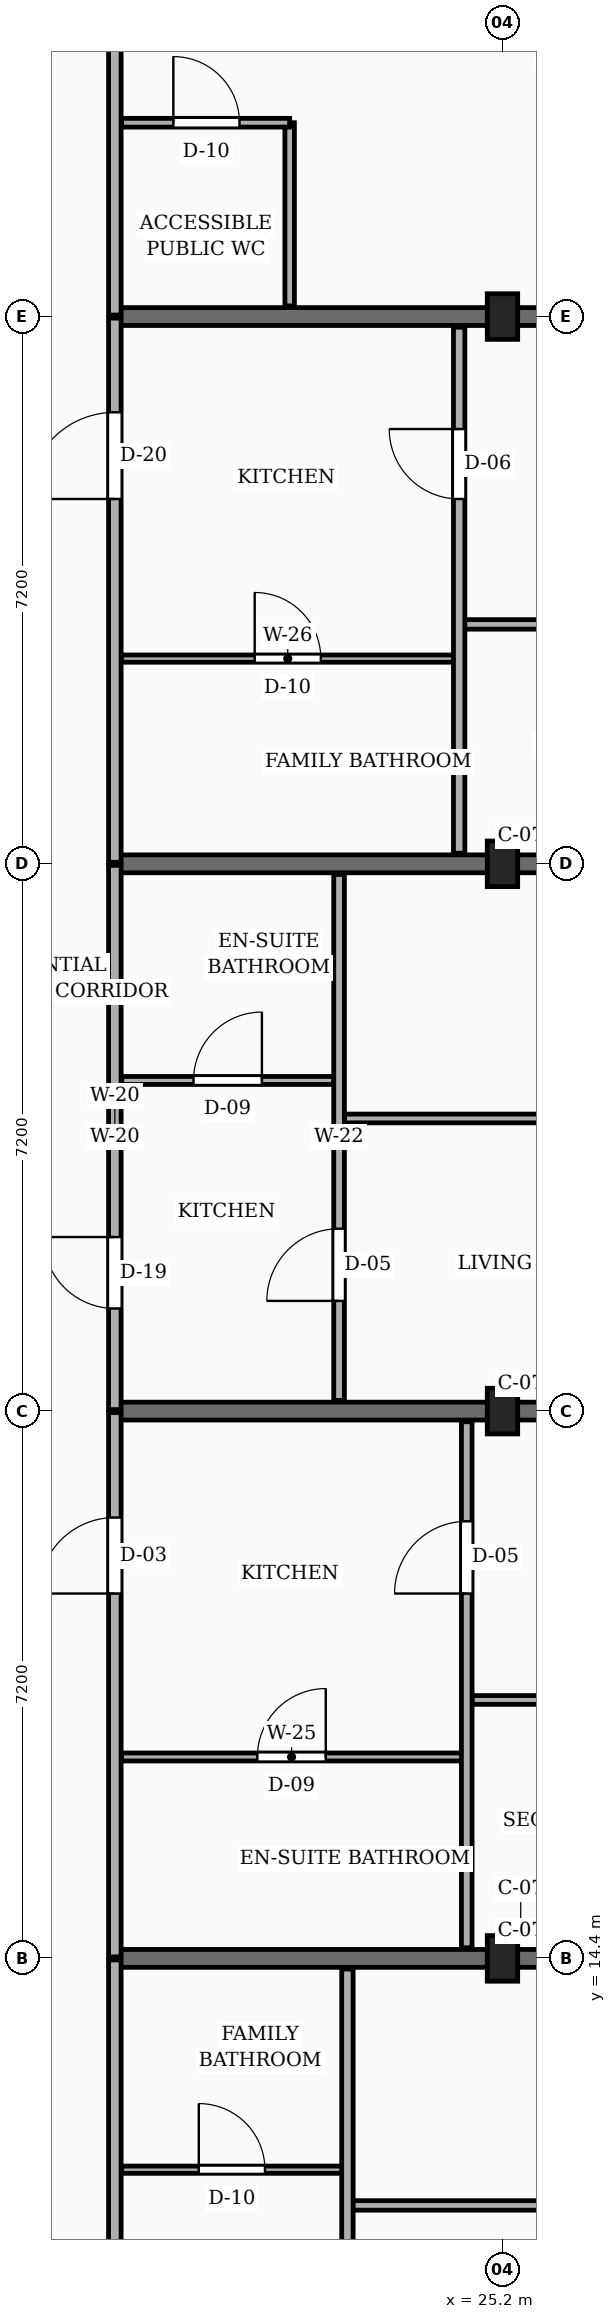
"""IFC4 building model, lengths in metres.
Left out: names, types, materials, properties, quantities, classifications, styles, units other than length and angle.
Written with IfcOpenShell. Run it as: python <this file> out.ifc"""

import sys

from ifc_helpers import new_model, si_unit, direction, frame, frame_2d, origin, origin_2d, place, context, subcontext, project, spatial, rectangle, extrude, element, fill, save


model = new_model("IFC4")
c1 = context("Model", 3, precision=1e-05, world=origin(), true_north=direction((0.0, 1.0)))
c2 = subcontext(c1, "Body", "Model", "MODEL_VIEW")
j1 = project(units=[si_unit("LENGTHUNIT", "METRE"), si_unit("PLANEANGLEUNIT", "RADIAN")], contexts=[c1])
p1 = place(None, origin())
s1 = spatial("IfcSite", under=j1, at=p1, CompositionType="ELEMENT")
p2 = place(p1, origin())
s2 = spatial("IfcBuilding", under=s1, at=p2, CompositionType="ELEMENT")
p3 = place(p2, frame((0.0, 0.0, 23.4)))
s3 = spatial("IfcBuildingStorey", under=s2, at=p3, CompositionType="ELEMENT", Elevation=23.4)
for number, where, z_axis, x_axis in (
    (1, (25.2, 14.4, 0.0), (0.0, 0.0, 1.0), (1.0, 0.0, 0.0)),
    (2, (25.2, 21.6, 0.0), (0.0, 0.0, 1.0), (1.0, 0.0, 0.0)),
    (3, (25.2, 28.8, 0.0), (0.0, 0.0, 1.0), (1.0, 0.0, 0.0)),
    (4, (25.2, 36.0, 0.0), (0.0, 0.0, 1.0), (1.0, 0.0, 0.0)),
):
    element("IfcColumn", number, at=place(p3, frame(where, z_axis=z_axis, x_axis=x_axis)), inside=s3, PredefinedType="COLUMN", context=c2, shape_type="SweptSolid", body=[
        extrude(rectangle(XDim=0.4, YDim=0.6, at=origin_2d()), origin(), (0.0, 0.0, 1.0), 3.15),
    ])
for number, where, z_axis, x_axis in (
    (5, (20.1, 14.4, 0.0), (0.0, 0.0, 1.0), (1.0, 0.0, 0.0)),
    (6, (20.1, 21.6, 0.0), (0.0, 0.0, 1.0), (1.0, 0.0, 0.0)),
    (7, (20.1, 28.8, 0.0), (0.0, 0.0, 1.0), (1.0, 0.0, 0.0)),
    (8, (20.1, 36.0, 0.0), (0.0, 0.0, 1.0), (1.0, 0.0, 0.0)),
):
    element("IfcWall", number, at=place(p3, frame(where, z_axis=z_axis, x_axis=x_axis)), inside=s3, PredefinedType="SOLIDWALL", context=c2, shape_type="SweptSolid", body=[
        extrude(rectangle(XDim=12.05, YDim=0.235, at=frame_2d((6.025, 0.0))), origin(), (0.0, 0.0, 1.0), 2.17),
    ])
p4 = place(p3, frame((20.1, 7.375, 0.0), z_axis=(0.0, 0.0, 1.0), x_axis=(0.0, 1.0, 0.0)))
e9 = element("IfcWall", 9, at=p4, inside=s3, PredefinedType="PARTITIONING", context=c2, shape_type="SweptSolid", body=[
    extrude(rectangle(XDim=7.005, YDim=0.165, at=frame_2d((3.502, 0.0))), origin(), (0.0, 0.0, 1.0), 2.305),
])
p5 = place(p4, frame((1.175, 0.0, 0.0)))
e10 = element("IfcOpeningElement", 10, at=p5, cuts=e9, PredefinedType="OPENING", context=c2, shape_type="SweptSolid", body=[
    extrude(rectangle(XDim=1.14, YDim=2.18, at=frame_2d((0.57, 1.09))), frame((0.0, 0.093, 0.0), z_axis=(0.0, -1.0, 0.0), x_axis=(1.0, 0.0, 0.0)), (0.0, 0.0, 1.0), 0.185),
])
p6 = place(p3, frame((20.1, 14.42, 0.0), z_axis=(0.0, 0.0, 1.0), x_axis=(0.0, 1.0, 0.0)))
e11 = element("IfcWall", 11, at=p6, inside=s3, PredefinedType="PARTITIONING", context=c2, shape_type="SweptSolid", body=[
    extrude(rectangle(XDim=7.16, YDim=0.165, at=frame_2d((3.58, 0.0))), origin(), (0.0, 0.0, 1.0), 2.305),
])
p7 = place(p6, frame((4.78, 0.0, 0.0)))
e12 = element("IfcOpeningElement", 12, at=p7, cuts=e11, PredefinedType="OPENING", context=c2, shape_type="SweptSolid", body=[
    extrude(rectangle(XDim=1.0, YDim=2.15, at=frame_2d((0.5, 1.075))), frame((0.0, 0.093, 0.0), z_axis=(0.0, -1.0, 0.0), x_axis=(1.0, 0.0, 0.0)), (0.0, 0.0, 1.0), 0.185),
])
p8 = place(p3, frame((20.1, 21.62, 0.0), z_axis=(0.0, 0.0, 1.0), x_axis=(0.0, 1.0, 0.0)))
e13 = element("IfcWall", 13, at=p8, inside=s3, PredefinedType="PARTITIONING", context=c2, shape_type="SweptSolid", body=[
    extrude(rectangle(XDim=7.16, YDim=0.165, at=frame_2d((3.58, 0.0))), origin(), (0.0, 0.0, 1.0), 2.305),
])
p9 = place(p8, frame((1.33, 0.0, 0.0)))
e14 = element("IfcOpeningElement", 14, at=p9, cuts=e13, PredefinedType="OPENING", context=c2, shape_type="SweptSolid", body=[
    extrude(rectangle(XDim=0.94, YDim=2.12, at=frame_2d((0.47, 1.06))), frame((0.0, 0.093, 0.0), z_axis=(0.0, -1.0, 0.0), x_axis=(1.0, 0.0, 0.0)), (0.0, 0.0, 1.0), 0.185),
])
p10 = place(p3, frame((20.1, 28.82, 0.0), z_axis=(0.0, 0.0, 1.0), x_axis=(0.0, 1.0, 0.0)))
e15 = element("IfcWall", 15, at=p10, inside=s3, PredefinedType="PARTITIONING", context=c2, shape_type="SweptSolid", body=[
    extrude(rectangle(XDim=7.16, YDim=0.165, at=frame_2d((3.58, 0.0))), origin(), (0.0, 0.0, 1.0), 2.305),
])
p11 = place(p10, frame((4.78, 0.0, 0.0)))
e16 = element("IfcOpeningElement", 16, at=p11, cuts=e15, PredefinedType="OPENING", context=c2, shape_type="SweptSolid", body=[
    extrude(rectangle(XDim=1.14, YDim=2.18, at=frame_2d((0.57, 1.09))), frame((0.0, 0.093, 0.0), z_axis=(0.0, -1.0, 0.0), x_axis=(1.0, 0.0, 0.0)), (0.0, 0.0, 1.0), 0.185),
])
p12 = place(p3, frame((20.1, 36.02, 0.0), z_axis=(0.0, 0.0, 1.0), x_axis=(0.0, 1.0, 0.0)))
e17 = element("IfcWall", 17, at=p12, inside=s3, PredefinedType="PARTITIONING", context=c2, shape_type="SweptSolid", body=[
    extrude(rectangle(XDim=7.005, YDim=0.165, at=frame_2d((3.502, 0.0))), origin(), (0.0, 0.0, 1.0), 2.305),
])
p13 = place(p12, frame((4.33, 0.0, 0.0)))
e18 = element("IfcOpeningElement", 18, at=p13, cuts=e17, PredefinedType="OPENING", context=c2, shape_type="SweptSolid", body=[
    extrude(rectangle(XDim=1.1, YDim=2.15, at=frame_2d((0.55, 1.075))), frame((0.0, 0.093, 0.0), z_axis=(0.0, -1.0, 0.0), x_axis=(1.0, 0.0, 0.0)), (0.0, 0.0, 1.0), 0.185),
])
p14 = place(p3, frame((23.23, 11.15, 0.0), z_axis=(0.0, 0.0, 1.0), x_axis=(1.0, 0.0, 0.0)))
e19 = element("IfcWall", 19, at=p14, inside=s3, PredefinedType="PARTITIONING", context=c2, shape_type="SweptSolid", body=[
    extrude(rectangle(XDim=8.995, YDim=0.125, at=frame_2d((4.498, 0.0))), origin(), (0.0, 0.0, 1.0), 2.305),
])
p15 = place(p14, frame((4.058, 0.0, 0.0)))
e20 = element("IfcOpeningElement", 20, at=p15, cuts=e19, PredefinedType="OPENING", context=c2, shape_type="SweptSolid", body=[
    extrude(rectangle(XDim=0.88, YDim=2.08, at=frame_2d((0.44, 1.04))), frame((0.0, 0.073, 0.0), z_axis=(0.0, -1.0, 0.0), x_axis=(1.0, 0.0, 0.0)), (0.0, 0.0, 1.0), 0.145),
])
p16 = place(p3, frame((20.19, 11.62, 0.0), z_axis=(0.0, 0.0, 1.0), x_axis=(1.0, 0.0, 0.0)))
e21 = element("IfcWall", 21, at=p16, inside=s3, PredefinedType="PARTITIONING", context=c2, shape_type="SweptSolid", body=[
    extrude(rectangle(XDim=2.9, YDim=0.095, at=frame_2d((1.45, 0.0))), origin(), (0.0, 0.0, 1.0), 2.305),
])
p17 = place(p16, frame((1.015, 0.0, 0.0)))
e22 = element("IfcOpeningElement", 22, at=p17, cuts=e21, PredefinedType="OPENING", context=c2, shape_type="SweptSolid", body=[
    extrude(rectangle(XDim=0.87, YDim=2.05, at=frame_2d((0.435, 1.025))), frame((0.0, 0.058, 0.0), z_axis=(0.0, -1.0, 0.0), x_axis=(1.0, 0.0, 0.0)), (0.0, 0.0, 1.0), 0.115),
])
p18 = place(p3, frame((23.16, 7.375, 0.0), z_axis=(0.0, 0.0, 1.0), x_axis=(0.0, 1.0, 0.0)))
e23 = element("IfcWall", 23, at=p18, inside=s3, PredefinedType="PARTITIONING", context=c2, shape_type="SweptSolid", body=[
    extrude(rectangle(XDim=6.885, YDim=0.15, at=frame_2d((3.442, 0.0))), origin(), (0.0, 0.0, 1.0), 2.305),
])
p19 = place(p18, frame((1.275, 0.0, 0.0)))
e24 = element("IfcOpeningElement", 24, at=p19, cuts=e23, PredefinedType="OPENING", context=c2, shape_type="SweptSolid", body=[
    extrude(rectangle(XDim=0.92, YDim=2.1, at=frame_2d((0.46, 1.05))), frame((0.0, 0.085, 0.0), z_axis=(0.0, -1.0, 0.0), x_axis=(1.0, 0.0, 0.0)), (0.0, 0.0, 1.0), 0.17),
])
p20 = place(p3, frame((24.8, 17.8, 0.0), z_axis=(0.0, 0.0, 1.0), x_axis=(1.0, 0.0, 0.0)))
e25 = element("IfcWall", 25, at=p20, inside=s3, PredefinedType="PARTITIONING", context=c2, shape_type="SweptSolid", body=[
    extrude(rectangle(XDim=7.425, YDim=0.115, at=frame_2d((3.712, 0.0))), origin(), (0.0, 0.0, 1.0), 2.305),
])
p21 = place(p20, frame((3.262, 0.0, 0.0)))
e26 = element("IfcOpeningElement", 26, at=p21, cuts=e25, PredefinedType="OPENING", context=c2, shape_type="SweptSolid", body=[
    extrude(rectangle(XDim=0.9, YDim=2.1, at=frame_2d((0.45, 1.05))), frame((0.0, 0.067, 0.0), z_axis=(0.0, -1.0, 0.0), x_axis=(1.0, 0.0, 0.0)), (0.0, 0.0, 1.0), 0.135),
])
p22 = place(p3, frame((20.19, 17.05, 0.0), z_axis=(0.0, 0.0, 1.0), x_axis=(1.0, 0.0, 0.0)))
e27 = element("IfcWall", 27, at=p22, inside=s3, PredefinedType="PARTITIONING", context=c2, shape_type="SweptSolid", body=[
    extrude(rectangle(XDim=4.47, YDim=0.105, at=frame_2d((2.235, 0.0))), origin(), (0.0, 0.0, 1.0), 2.305),
])
p23 = place(p22, frame((1.785, 0.0, 0.0)))
e28 = element("IfcOpeningElement", 28, at=p23, cuts=e27, PredefinedType="OPENING", context=c2, shape_type="SweptSolid", body=[
    extrude(rectangle(XDim=0.9, YDim=2.05, at=frame_2d((0.45, 1.025))), frame((0.0, 0.062, 0.0), z_axis=(0.0, -1.0, 0.0), x_axis=(1.0, 0.0, 0.0)), (0.0, 0.0, 1.0), 0.125),
])
p24 = place(p3, frame((24.73, 14.54, 0.0), z_axis=(0.0, 0.0, 1.0), x_axis=(0.0, 1.0, 0.0)))
e29 = element("IfcWall", 29, at=p24, inside=s3, PredefinedType="PARTITIONING", context=c2, shape_type="SweptSolid", body=[
    extrude(rectangle(XDim=6.92, YDim=0.14, at=frame_2d((3.46, 0.0))), origin(), (0.0, 0.0, 1.0), 2.305),
])
p25 = place(p24, frame((4.66, 0.0, 0.0)))
e30 = element("IfcOpeningElement", 30, at=p25, cuts=e29, PredefinedType="OPENING", context=c2, shape_type="SweptSolid", body=[
    extrude(rectangle(XDim=0.95, YDim=2.1, at=frame_2d((0.475, 1.05))), frame((0.0, 0.08, 0.0), z_axis=(0.0, -1.0, 0.0), x_axis=(1.0, 0.0, 0.0)), (0.0, 0.0, 1.0), 0.16),
])
p26 = place(p3, frame((23.12, 25.45, 0.0), z_axis=(0.0, 0.0, 1.0), x_axis=(1.0, 0.0, 0.0)))
e31 = element("IfcWall", 31, at=p26, inside=s3, PredefinedType="PARTITIONING", context=c2, shape_type="SweptSolid", body=[
    extrude(rectangle(XDim=9.105, YDim=0.115, at=frame_2d((4.552, 0.0))), origin(), (0.0, 0.0, 1.0), 2.305),
])
p27 = place(p26, frame((4.103, 0.0, 0.0)))
e32 = element("IfcOpeningElement", 32, at=p27, cuts=e31, PredefinedType="OPENING", context=c2, shape_type="SweptSolid", body=[
    extrude(rectangle(XDim=0.9, YDim=2.1, at=frame_2d((0.45, 1.05))), frame((0.0, 0.067, 0.0), z_axis=(0.0, -1.0, 0.0), x_axis=(1.0, 0.0, 0.0)), (0.0, 0.0, 1.0), 0.135),
])
p28 = place(p3, frame((20.19, 25.95, 0.0), z_axis=(0.0, 0.0, 1.0), x_axis=(1.0, 0.0, 0.0)))
e33 = element("IfcWall", 33, at=p28, inside=s3, PredefinedType="PARTITIONING", context=c2, shape_type="SweptSolid", body=[
    extrude(rectangle(XDim=2.79, YDim=0.105, at=frame_2d((1.395, 0.0))), origin(), (0.0, 0.0, 1.0), 2.305),
])
p29 = place(p28, frame((0.945, 0.0, 0.0)))
e34 = element("IfcOpeningElement", 34, at=p29, cuts=e33, PredefinedType="OPENING", context=c2, shape_type="SweptSolid", body=[
    extrude(rectangle(XDim=0.9, YDim=2.05, at=frame_2d((0.45, 1.025))), frame((0.0, 0.062, 0.0), z_axis=(0.0, -1.0, 0.0), x_axis=(1.0, 0.0, 0.0)), (0.0, 0.0, 1.0), 0.125),
])
p30 = place(p3, frame((23.05, 21.74, 0.0), z_axis=(0.0, 0.0, 1.0), x_axis=(0.0, 1.0, 0.0)))
e35 = element("IfcWall", 35, at=p30, inside=s3, PredefinedType="PARTITIONING", context=c2, shape_type="SweptSolid", body=[
    extrude(rectangle(XDim=6.92, YDim=0.14, at=frame_2d((3.46, 0.0))), origin(), (0.0, 0.0, 1.0), 2.305),
])
p31 = place(p30, frame((1.31, 0.0, 0.0)))
e36 = element("IfcOpeningElement", 36, at=p31, cuts=e35, PredefinedType="OPENING", context=c2, shape_type="SweptSolid", body=[
    extrude(rectangle(XDim=0.95, YDim=2.1, at=frame_2d((0.475, 1.05))), frame((0.0, 0.08, 0.0), z_axis=(0.0, -1.0, 0.0), x_axis=(1.0, 0.0, 0.0)), (0.0, 0.0, 1.0), 0.16),
])
p32 = place(p3, frame((24.7, 31.95, 0.0), z_axis=(0.0, 0.0, 1.0), x_axis=(1.0, 0.0, 0.0)))
e37 = element("IfcWall", 37, at=p32, inside=s3, PredefinedType="PARTITIONING", context=c2, shape_type="SweptSolid", body=[
    extrude(rectangle(XDim=7.525, YDim=0.125, at=frame_2d((3.763, 0.0))), origin(), (0.0, 0.0, 1.0), 2.305),
])
p33 = place(p32, frame((3.323, 0.0, 0.0)))
e38 = element("IfcOpeningElement", 38, at=p33, cuts=e37, PredefinedType="OPENING", context=c2, shape_type="SweptSolid", body=[
    extrude(rectangle(XDim=0.88, YDim=2.08, at=frame_2d((0.44, 1.04))), frame((0.0, 0.073, 0.0), z_axis=(0.0, -1.0, 0.0), x_axis=(1.0, 0.0, 0.0)), (0.0, 0.0, 1.0), 0.145),
])
p34 = place(p3, frame((20.19, 31.5, 0.0), z_axis=(0.0, 0.0, 1.0), x_axis=(1.0, 0.0, 0.0)))
e39 = element("IfcWall", 39, at=p34, inside=s3, PredefinedType="PARTITIONING", context=c2, shape_type="SweptSolid", body=[
    extrude(rectangle(XDim=4.37, YDim=0.095, at=frame_2d((2.185, 0.0))), origin(), (0.0, 0.0, 1.0), 2.305),
])
p35 = place(p34, frame((1.75, 0.0, 0.0)))
e40 = element("IfcOpeningElement", 40, at=p35, cuts=e39, PredefinedType="OPENING", context=c2, shape_type="SweptSolid", body=[
    extrude(rectangle(XDim=0.87, YDim=2.05, at=frame_2d((0.435, 1.025))), frame((0.0, 0.058, 0.0), z_axis=(0.0, -1.0, 0.0), x_axis=(1.0, 0.0, 0.0)), (0.0, 0.0, 1.0), 0.115),
])
p36 = place(p3, frame((24.63, 28.94, 0.0), z_axis=(0.0, 0.0, 1.0), x_axis=(0.0, 1.0, 0.0)))
e41 = element("IfcWall", 41, at=p36, inside=s3, PredefinedType="PARTITIONING", context=c2, shape_type="SweptSolid", body=[
    extrude(rectangle(XDim=6.92, YDim=0.15, at=frame_2d((3.46, 0.0))), origin(), (0.0, 0.0, 1.0), 2.305),
])
p37 = place(p36, frame((4.66, 0.0, 0.0)))
e42 = element("IfcOpeningElement", 42, at=p37, cuts=e41, PredefinedType="OPENING", context=c2, shape_type="SweptSolid", body=[
    extrude(rectangle(XDim=0.92, YDim=2.1, at=frame_2d((0.46, 1.05))), frame((0.0, 0.085, 0.0), z_axis=(0.0, -1.0, 0.0), x_axis=(1.0, 0.0, 0.0)), (0.0, 0.0, 1.0), 0.17),
])
p38 = place(p3, frame((22.4, 36.14, 0.0), z_axis=(0.0, 0.0, 1.0), x_axis=(0.0, 1.0, 0.0)))
e43 = element("IfcWall", 43, at=p38, inside=s3, PredefinedType="PARTITIONING", context=c2, shape_type="SweptSolid", body=[
    extrude(rectangle(XDim=2.41, YDim=0.125, at=frame_2d((1.205, 0.0))), origin(), (0.0, 0.0, 1.0), 2.305),
])
p39 = place(p3, frame((20.19, 38.55, 0.0), z_axis=(0.0, 0.0, 1.0), x_axis=(1.0, 0.0, 0.0)))
e44 = element("IfcWall", 44, at=p39, inside=s3, PredefinedType="PARTITIONING", context=c2, shape_type="SweptSolid", body=[
    extrude(rectangle(XDim=2.21, YDim=0.115, at=frame_2d((1.105, 0.0))), origin(), (0.0, 0.0, 1.0), 2.305),
])
p40 = place(p39, frame((0.68, 0.0, 0.0)))
e45 = element("IfcOpeningElement", 45, at=p40, cuts=e44, PredefinedType="OPENING", context=c2, shape_type="SweptSolid", body=[
    extrude(rectangle(XDim=0.87, YDim=2.05, at=frame_2d((0.435, 1.025))), frame((0.0, 0.067, 0.0), z_axis=(0.0, -1.0, 0.0), x_axis=(1.0, 0.0, 0.0)), (0.0, 0.0, 1.0), 0.135),
])
p41 = place(p7, origin())
e46 = element("IfcDoor", 46, at=p41, inside=s3, OperationType="SINGLE_SWING_LEFT", PredefinedType="DOOR", context=c2, shape_type="SweptSolid", body=[
    extrude(rectangle(XDim=1.0, YDim=2.15, at=frame_2d((0.5, 1.075))), frame((0.0, 0.025, 0.0), z_axis=(0.0, -1.0, 0.0), x_axis=(1.0, 0.0, 0.0)), (0.0, 0.0, 1.0), 0.05),
])
fill(e12, e46)
p42 = place(p9, origin())
e47 = element("IfcDoor", 47, at=p42, inside=s3, OperationType="SINGLE_SWING_RIGHT", PredefinedType="DOOR", context=c2, shape_type="SweptSolid", body=[
    extrude(rectangle(XDim=0.94, YDim=2.12, at=frame_2d((0.47, 1.06))), frame((0.0, 0.025, 0.0), z_axis=(0.0, -1.0, 0.0), x_axis=(1.0, 0.0, 0.0)), (0.0, 0.0, 1.0), 0.05),
])
fill(e14, e47)
p43 = place(p11, origin())
e48 = element("IfcDoor", 48, at=p43, inside=s3, OperationType="SINGLE_SWING_LEFT", PredefinedType="DOOR", context=c2, shape_type="SweptSolid", body=[
    extrude(rectangle(XDim=1.14, YDim=2.18, at=frame_2d((0.57, 1.09))), frame((0.0, 0.025, 0.0), z_axis=(0.0, -1.0, 0.0), x_axis=(1.0, 0.0, 0.0)), (0.0, 0.0, 1.0), 0.05),
])
fill(e16, e48)
p44 = place(p17, origin())
e49 = element("IfcDoor", 49, at=p44, inside=s3, OperationType="SINGLE_SWING_LEFT", PredefinedType="DOOR", context=c2, shape_type="SweptSolid", body=[
    extrude(rectangle(XDim=0.87, YDim=2.05, at=frame_2d((0.435, 1.025))), frame((0.0, 0.025, 0.0), z_axis=(0.0, -1.0, 0.0), x_axis=(1.0, 0.0, 0.0)), (0.0, 0.0, 1.0), 0.05),
])
fill(e22, e49)
p45 = place(p23, origin())
e50 = element("IfcDoor", 50, at=p45, inside=s3, OperationType="SINGLE_SWING_RIGHT", PredefinedType="DOOR", context=c2, shape_type="SweptSolid", body=[
    extrude(rectangle(XDim=0.9, YDim=2.05, at=frame_2d((0.45, 1.025))), frame((0.0, 0.025, 0.0), z_axis=(0.0, -1.0, 0.0), x_axis=(1.0, 0.0, 0.0)), (0.0, 0.0, 1.0), 0.05),
])
fill(e28, e50)
p46 = place(p25, origin())
e51 = element("IfcDoor", 51, at=p46, inside=s3, OperationType="SINGLE_SWING_LEFT", PredefinedType="DOOR", context=c2, shape_type="SweptSolid", body=[
    extrude(rectangle(XDim=0.95, YDim=2.1, at=frame_2d((0.475, 1.05))), frame((0.0, 0.025, 0.0), z_axis=(0.0, -1.0, 0.0), x_axis=(1.0, 0.0, 0.0)), (0.0, 0.0, 1.0), 0.05),
])
fill(e30, e51)
p47 = place(p29, origin())
e52 = element("IfcDoor", 52, at=p47, inside=s3, OperationType="SINGLE_SWING_RIGHT", PredefinedType="DOOR", context=c2, shape_type="SweptSolid", body=[
    extrude(rectangle(XDim=0.9, YDim=2.05, at=frame_2d((0.45, 1.025))), frame((0.0, 0.025, 0.0), z_axis=(0.0, -1.0, 0.0), x_axis=(1.0, 0.0, 0.0)), (0.0, 0.0, 1.0), 0.05),
])
fill(e34, e52)
p48 = place(p31, origin())
e53 = element("IfcDoor", 53, at=p48, inside=s3, OperationType="SINGLE_SWING_LEFT", PredefinedType="DOOR", context=c2, shape_type="SweptSolid", body=[
    extrude(rectangle(XDim=0.95, YDim=2.1, at=frame_2d((0.475, 1.05))), frame((0.0, 0.025, 0.0), z_axis=(0.0, -1.0, 0.0), x_axis=(1.0, 0.0, 0.0)), (0.0, 0.0, 1.0), 0.05),
])
fill(e36, e53)
p49 = place(p35, origin())
e54 = element("IfcDoor", 54, at=p49, inside=s3, OperationType="SINGLE_SWING_LEFT", PredefinedType="DOOR", context=c2, shape_type="SweptSolid", body=[
    extrude(rectangle(XDim=0.87, YDim=2.05, at=frame_2d((0.435, 1.025))), frame((0.0, 0.025, 0.0), z_axis=(0.0, -1.0, 0.0), x_axis=(1.0, 0.0, 0.0)), (0.0, 0.0, 1.0), 0.05),
])
fill(e40, e54)
p50 = place(p37, origin())
e55 = element("IfcDoor", 55, at=p50, inside=s3, OperationType="SINGLE_SWING_RIGHT", PredefinedType="DOOR", context=c2, shape_type="SweptSolid", body=[
    extrude(rectangle(XDim=0.92, YDim=2.1, at=frame_2d((0.46, 1.05))), frame((0.0, 0.025, 0.0), z_axis=(0.0, -1.0, 0.0), x_axis=(1.0, 0.0, 0.0)), (0.0, 0.0, 1.0), 0.05),
])
fill(e42, e55)
p51 = place(p40, origin())
e56 = element("IfcDoor", 56, at=p51, inside=s3, OperationType="SINGLE_SWING_LEFT", PredefinedType="DOOR", context=c2, shape_type="SweptSolid", body=[
    extrude(rectangle(XDim=0.87, YDim=2.05, at=frame_2d((0.435, 1.025))), frame((0.0, 0.025, 0.0), z_axis=(0.0, -1.0, 0.0), x_axis=(1.0, 0.0, 0.0)), (0.0, 0.0, 1.0), 0.05),
])
fill(e45, e56)
save(model, sys.argv[1])
